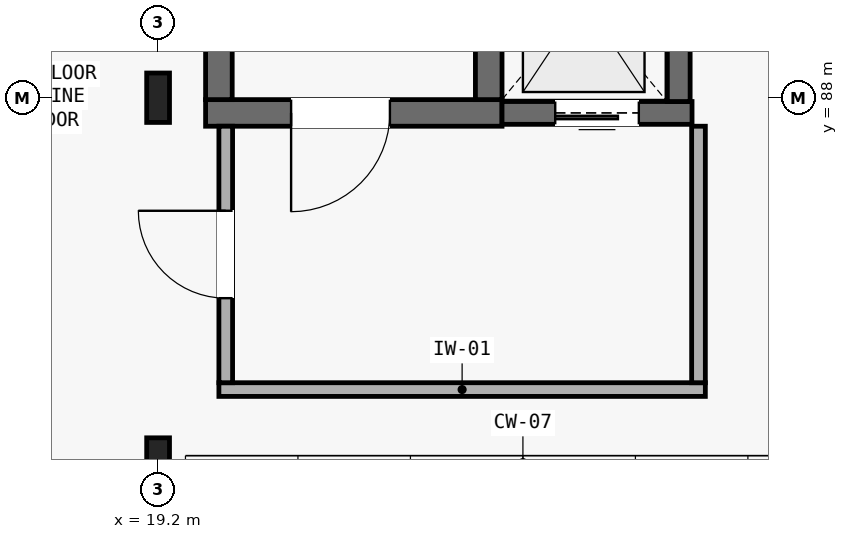
"""IFC4 building model, lengths in metres.
Left out: names, types, materials, properties, quantities, classifications, styles, units other than length and angle.
Written with IfcOpenShell. Run it as: python <this file> out.ifc"""

import sys

from ifc_helpers import new_model, si_unit, direction, frame, frame_2d, origin, origin_2d, place, context, subcontext, project, spatial, rectangle, i_section, extrude, element, fill, save


model = new_model("IFC4")
c1 = context("Model", 3, precision=1e-05, world=origin(), true_north=direction((0.0, 1.0)))
c2 = subcontext(c1, "Body", "Model", "MODEL_VIEW")
j1 = project(units=[si_unit("LENGTHUNIT", "METRE"), si_unit("PLANEANGLEUNIT", "RADIAN")], contexts=[c1])
p1 = place(None, origin())
s1 = spatial("IfcSite", under=j1, at=p1, CompositionType="ELEMENT")
p2 = place(p1, origin())
s2 = spatial("IfcBuilding", under=s1, at=p2, CompositionType="ELEMENT")
p3 = place(p2, frame((0.0, 0.0, 5.25)))
s3 = spatial("IfcBuildingStorey", under=s2, at=p3, CompositionType="ELEMENT", Elevation=5.25)
for number, where, z_axis, x_axis in (
    (1, (19.2, 83.2, 0.0), (0.0, 0.0, 1.0), (1.0, 0.0, 0.0)),
    (2, (19.2, 88.0, 0.0), (0.0, 0.0, 1.0), (1.0, 0.0, 0.0)),
):
    element("IfcColumn", number, at=place(p3, frame(where, z_axis=z_axis, x_axis=x_axis)), inside=s3, PredefinedType="COLUMN", context=c2, shape_type="SweptSolid", body=[
        extrude(i_section(OverallWidth=0.3, OverallDepth=0.65, WebThickness=0.016, FlangeThickness=0.031, FilletRadius=0.027, at=origin_2d()), origin(), (0.0, 0.0, 1.0), 4.2),
    ])
p4 = place(p3, frame((19.825, 87.8, 0.0), z_axis=(0.0, 0.0, 1.0), x_axis=(1.0, 0.0, 0.0)))
e3 = element("IfcWall", 3, at=p4, inside=s3, PredefinedType="SHEAR", context=c2, shape_type="SweptSolid", body=[
    extrude(rectangle(XDim=3.9, YDim=0.35, at=frame_2d((1.95, 0.0))), origin(), (0.0, 0.0, 1.0), 3.96),
])
p5 = place(p4, frame((1.125, 0.0, 0.0)))
e4 = element("IfcOpeningElement", 4, at=p5, cuts=e3, PredefinedType="OPENING", context=c2, shape_type="SweptSolid", body=[
    extrude(rectangle(XDim=1.3, YDim=2.15, at=frame_2d((0.65, 1.075))), frame((0.0, 0.185, 0.0), z_axis=(0.0, -1.0, 0.0), x_axis=(1.0, 0.0, 0.0)), (0.0, 0.0, 1.0), 0.37),
])
for number, where, z_axis, x_axis in (
    (5, (20.0, 87.975, 0.0), (0.0, 0.0, 1.0), (0.0, 1.0, 0.0)),
    (6, (23.55, 87.975, 0.0), (0.0, 0.0, 1.0), (0.0, 1.0, 0.0)),
):
    element("IfcWall", number, at=place(p3, frame(where, z_axis=z_axis, x_axis=x_axis)), inside=s3, PredefinedType="SHEAR", context=c2, shape_type="SweptSolid", body=[
        extrude(rectangle(XDim=7.6, YDim=0.35, at=frame_2d((3.8, 0.0))), origin(), (0.0, 0.0, 1.0), 3.96),
    ])
p6 = place(p3, frame((23.725, 87.8, 0.0), z_axis=(0.0, 0.0, 1.0), x_axis=(1.0, 0.0, 0.0)))
e7 = element("IfcWall", 7, at=p6, inside=s3, PredefinedType="SHEAR", context=c2, shape_type="SweptSolid", body=[
    extrude(rectangle(XDim=2.5, YDim=0.3, at=frame_2d((1.25, 0.0))), origin(), (0.0, 0.0, 1.0), 3.96),
])
p7 = place(p6, frame((0.7, 0.0, 0.0)))
e8 = element("IfcOpeningElement", 8, at=p7, cuts=e7, PredefinedType="OPENING", context=c2, shape_type="SweptSolid", body=[
    extrude(rectangle(XDim=1.1, YDim=2.1, at=frame_2d((0.55, 1.05))), frame((0.0, 0.16, 0.0), z_axis=(0.0, -1.0, 0.0), x_axis=(1.0, 0.0, 0.0)), (0.0, 0.0, 1.0), 0.32),
])
p8 = place(p3, frame((26.05, 87.95, 0.0), z_axis=(0.0, 0.0, 1.0), x_axis=(0.0, 1.0, 0.0)))
e9 = element("IfcWall", 9, at=p8, inside=s3, PredefinedType="SHEAR", context=c2, shape_type="SweptSolid", body=[
    extrude(rectangle(XDim=2.65, YDim=0.3, at=frame_2d((1.325, 0.0))), origin(), (0.0, 0.0, 1.0), 3.96),
])
p9 = place(p3, frame((20.0, 84.16, 0.0), z_axis=(0.0, 0.0, 1.0), x_axis=(1.0, 0.0, 0.0)))
e10 = element("IfcWall", 10, at=p9, inside=s3, PredefinedType="PARTITIONING", context=c2, shape_type="SweptSolid", body=[
    extrude(rectangle(XDim=6.4, YDim=0.18, at=frame_2d((3.2, 0.0))), origin(), (0.0, 0.0, 1.0), 3.96),
])
p10 = place(p3, frame((20.09, 84.25, 0.0), z_axis=(0.0, 0.0, 1.0), x_axis=(0.0, 1.0, 0.0)))
e11 = element("IfcWall", 11, at=p10, inside=s3, PredefinedType="PARTITIONING", context=c2, shape_type="SweptSolid", body=[
    extrude(rectangle(XDim=3.375, YDim=0.18, at=frame_2d((1.688, 0.0))), origin(), (0.0, 0.0, 1.0), 3.96),
])
p11 = place(p10, frame((1.113, 0.0, 0.0)))
e12 = element("IfcOpeningElement", 12, at=p11, cuts=e11, PredefinedType="OPENING", context=c2, shape_type="SweptSolid", body=[
    extrude(rectangle(XDim=1.15, YDim=2.15, at=frame_2d((0.575, 1.075))), frame((0.0, 0.1, 0.0), z_axis=(0.0, -1.0, 0.0), x_axis=(1.0, 0.0, 0.0)), (0.0, 0.0, 1.0), 0.2),
])
p12 = place(p3, frame((26.31, 84.25, 0.0), z_axis=(0.0, 0.0, 1.0), x_axis=(0.0, 1.0, 0.0)))
e13 = element("IfcWall", 13, at=p12, inside=s3, PredefinedType="PARTITIONING", context=c2, shape_type="SweptSolid", body=[
    extrude(rectangle(XDim=3.375, YDim=0.18, at=frame_2d((1.688, 0.0))), origin(), (0.0, 0.0, 1.0), 3.96),
])
p13 = place(p5, frame((1.3, 0.0, 0.0), z_axis=(0.0, 0.0, 1.0), x_axis=(-1.0, 0.0, 0.0)))
e14 = element("IfcDoor", 14, at=p13, inside=s3, OperationType="SINGLE_SWING_LEFT", PredefinedType="DOOR", context=c2, shape_type="SweptSolid", body=[
    extrude(rectangle(XDim=1.3, YDim=2.15, at=frame_2d((0.65, 1.075))), frame((0.0, 0.025, 0.0), z_axis=(0.0, -1.0, 0.0), x_axis=(1.0, 0.0, 0.0)), (0.0, 0.0, 1.0), 0.05),
])
fill(e4, e14)
p14 = place(p7, frame((1.1, 0.0, 0.0), z_axis=(0.0, 0.0, 1.0), x_axis=(-1.0, 0.0, 0.0)))
e15 = element("IfcDoor", 15, at=p14, inside=s3, OperationType="SLIDING_TO_LEFT", PredefinedType="DOOR", context=c2, shape_type="SweptSolid", body=[
    extrude(rectangle(XDim=1.1, YDim=2.1, at=frame_2d((0.55, 1.05))), frame((0.0, 0.025, 0.0), z_axis=(0.0, -1.0, 0.0), x_axis=(1.0, 0.0, 0.0)), (0.0, 0.0, 1.0), 0.05),
])
fill(e8, e15)
p15 = place(p11, origin())
e16 = element("IfcDoor", 16, at=p15, inside=s3, OperationType="SINGLE_SWING_RIGHT", PredefinedType="DOOR", context=c2, shape_type="SweptSolid", body=[
    extrude(rectangle(XDim=1.15, YDim=2.15, at=frame_2d((0.575, 1.075))), frame((0.0, 0.025, 0.0), z_axis=(0.0, -1.0, 0.0), x_axis=(1.0, 0.0, 0.0)), (0.0, 0.0, 1.0), 0.05),
])
fill(e12, e16)
save(model, sys.argv[1])
